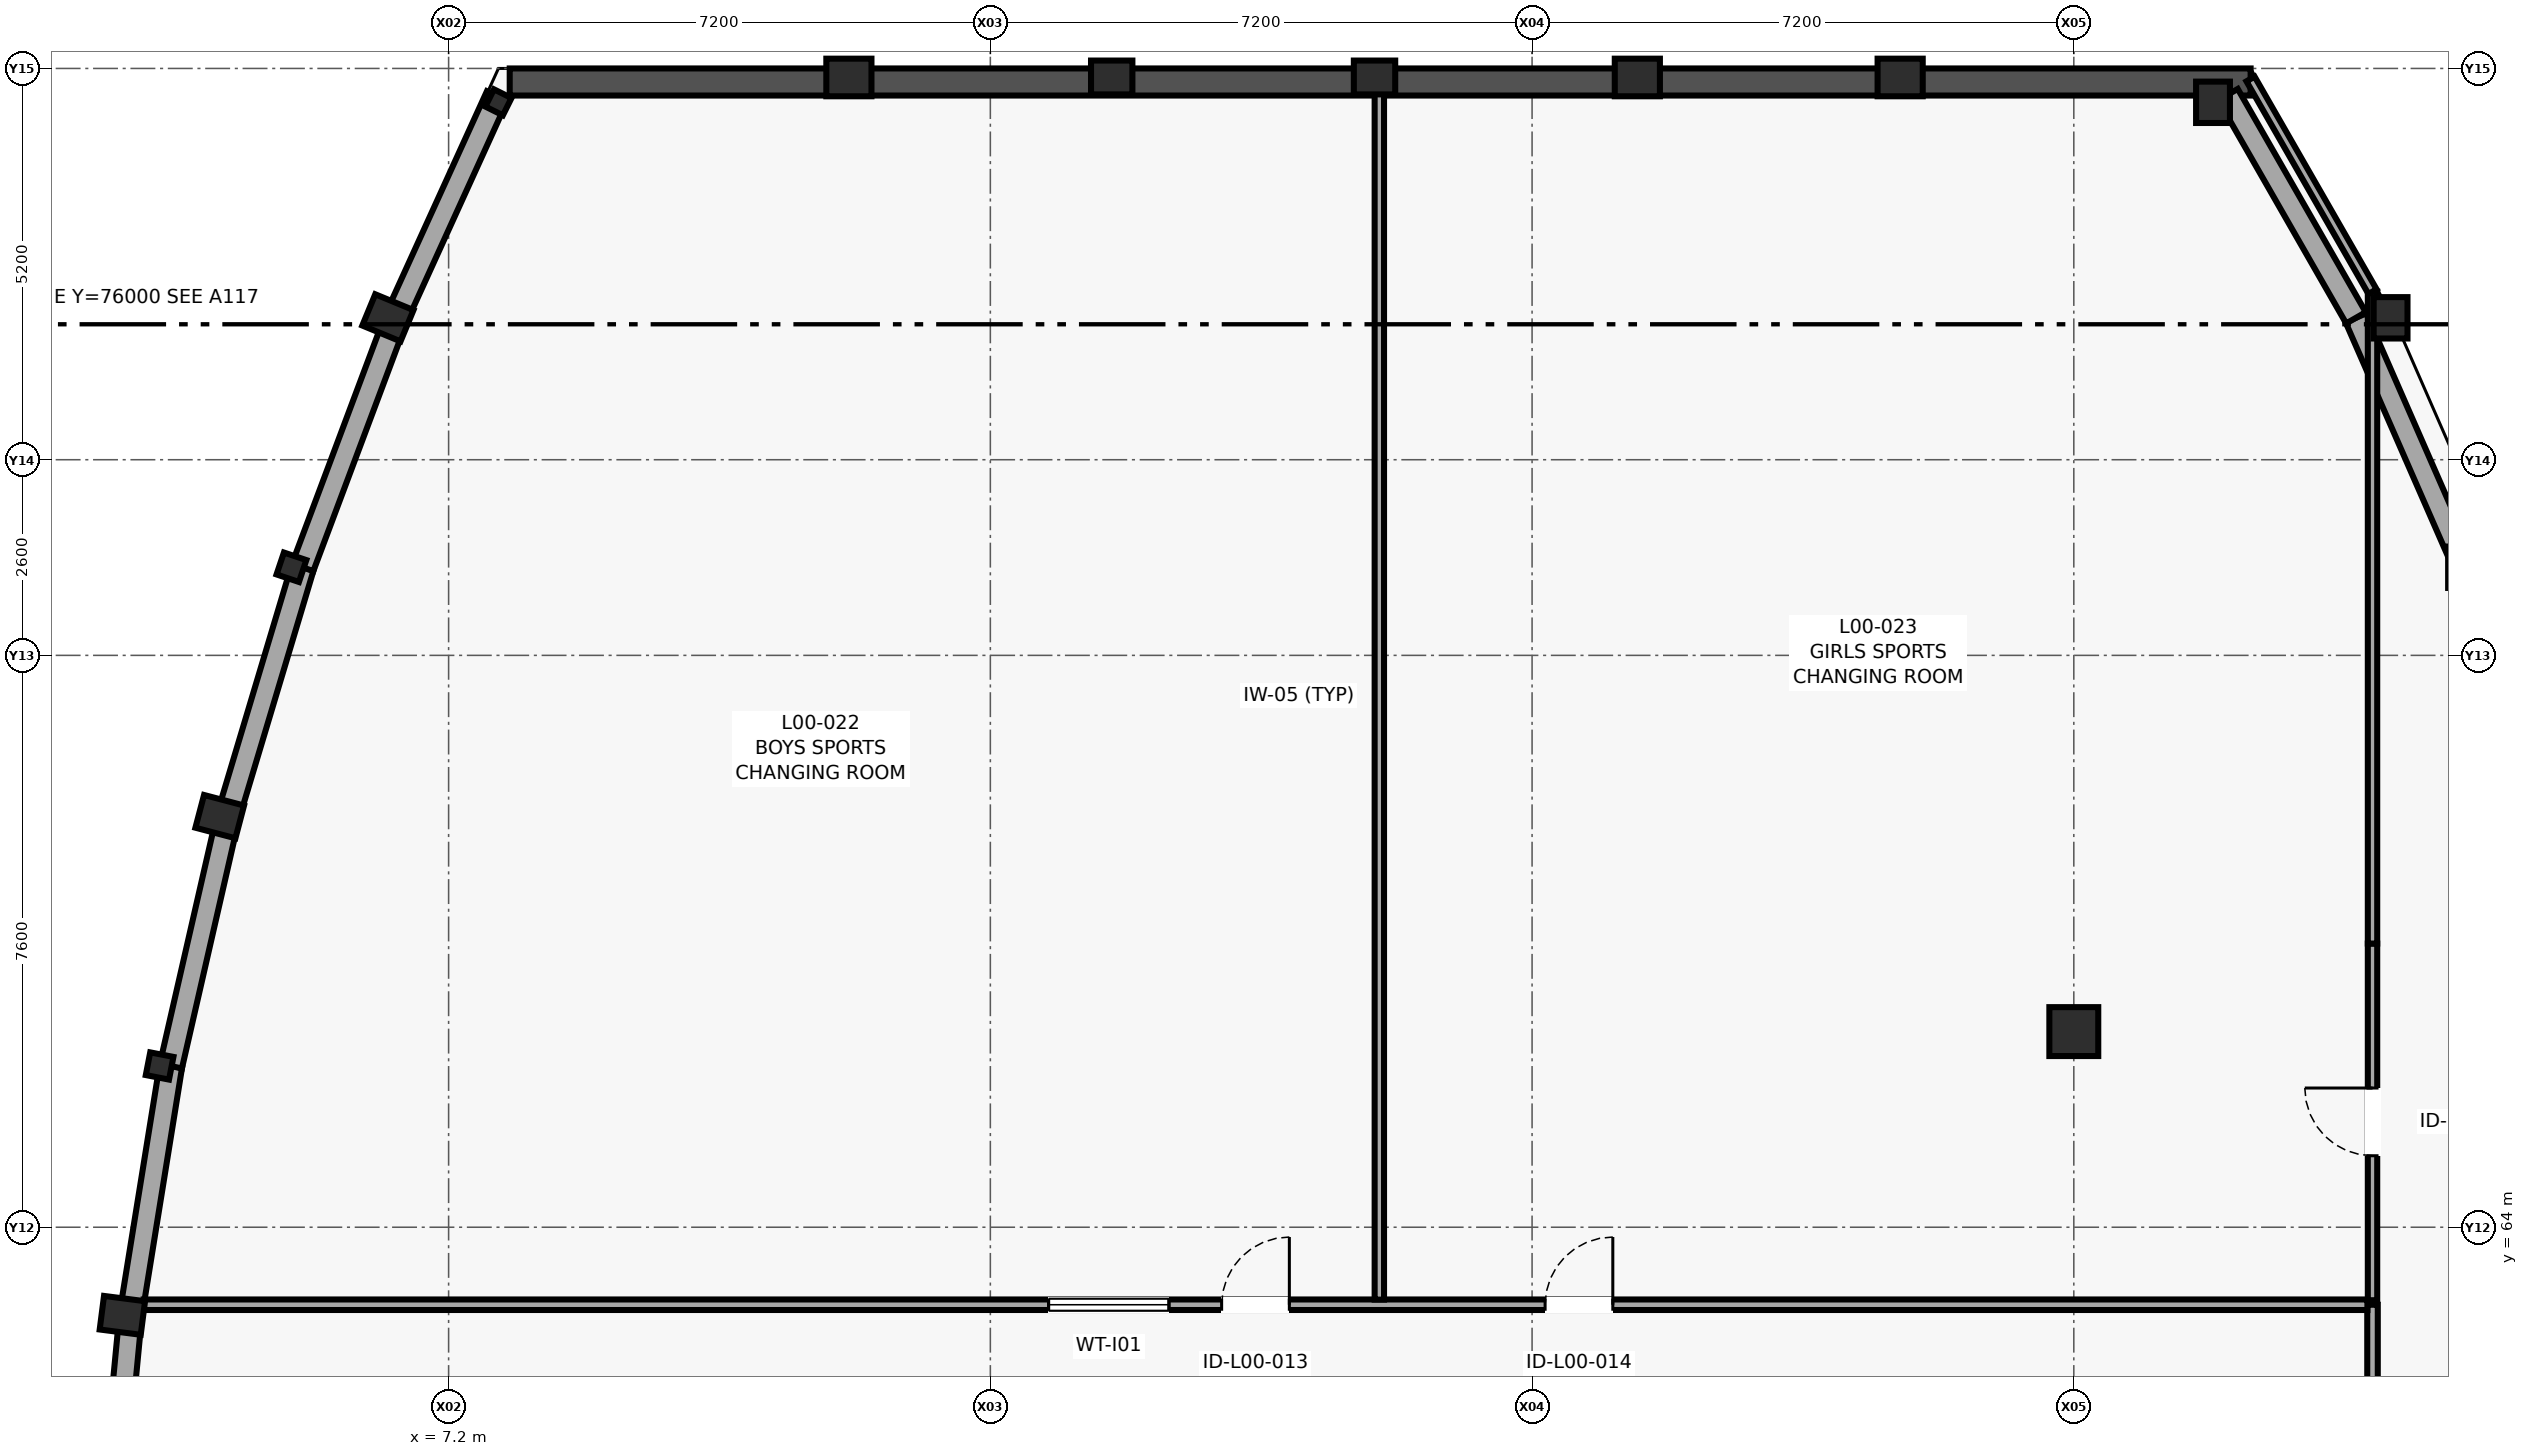
"""IFC4 building model, lengths in metres.
Left out: names, types, materials, properties, quantities, classifications, styles, units other than length and angle.
Written with IfcOpenShell. Run it as: python <this file> out.ifc"""

import sys

from ifc_helpers import new_model, si_unit, direction, frame, frame_2d, origin, origin_2d, place, context, subcontext, project, spatial, rectangle, i_section, extrude, element, fill, save


model = new_model("IFC4")
c1 = context("Model", 3, precision=1e-05, world=origin(), true_north=direction((0.0, 1.0)))
c2 = subcontext(c1, "Body", "Model", "MODEL_VIEW")
j1 = project(units=[si_unit("LENGTHUNIT", "METRE"), si_unit("PLANEANGLEUNIT", "RADIAN")], contexts=[c1])
p1 = place(None, origin())
s1 = spatial("IfcSite", under=j1, at=p1, CompositionType="ELEMENT")
p2 = place(p1, origin())
s2 = spatial("IfcBuilding", under=s1, at=p2, CompositionType="ELEMENT")
p3 = place(p2, origin())
s3 = spatial("IfcBuildingStorey", under=s2, at=p3, CompositionType="ELEMENT", Elevation=0.0)
p4 = place(p3, frame((2.864, 62.829, 0.0), z_axis=(0.0, 0.0, 1.0), x_axis=(0.12741083733, 0.991850028246, 0.0)))
e1 = element("IfcColumn", 1, at=p4, inside=s3, PredefinedType="PILASTER", context=c2, shape_type="SweptSolid", body=[
    extrude(rectangle(XDim=0.45, YDim=0.55, at=origin_2d()), origin(), (0.0, 0.0, 1.0), 4.2),
])
p5 = place(p3, frame((3.359, 66.143, 0.0), z_axis=(0.0, 0.0, 1.0), x_axis=(0.191151636272, 0.981560518741, 0.0)))
e2 = element("IfcColumn", 2, at=p5, inside=s3, PredefinedType="COLUMN", context=c2, shape_type="SweptSolid", body=[
    extrude(i_section(OverallWidth=0.307, OverallDepth=0.314, WebThickness=0.012, FlangeThickness=0.019, FilletRadius=0.015, at=origin_2d()), origin(), (0.0, 0.0, 1.0), 4.2),
])
p6 = place(p3, frame((4.158, 69.457, 0.0), z_axis=(0.0, 0.0, 1.0), x_axis=(0.2549394954, 0.966957007154, 0.0)))
e3 = element("IfcColumn", 3, at=p6, inside=s3, PredefinedType="PILASTER", context=c2, shape_type="SweptSolid", body=[
    extrude(rectangle(XDim=0.45, YDim=0.55, at=origin_2d()), origin(), (0.0, 0.0, 1.0), 4.2),
])
p7 = place(p3, frame((5.111, 72.771, 0.0), z_axis=(0.0, 0.0, 1.0), x_axis=(0.318628456287, 0.947879690069, 0.0)))
e4 = element("IfcColumn", 4, at=p7, inside=s3, PredefinedType="COLUMN", context=c2, shape_type="SweptSolid", body=[
    extrude(i_section(OverallWidth=0.307, OverallDepth=0.314, WebThickness=0.012, FlangeThickness=0.019, FilletRadius=0.015, at=origin_2d()), origin(), (0.0, 0.0, 1.0), 4.2),
])
p8 = place(p3, frame((6.393, 76.086, 0.0), z_axis=(0.0, 0.0, 1.0), x_axis=(0.382360914263, 0.92401305794, 0.0)))
e5 = element("IfcColumn", 5, at=p8, inside=s3, PredefinedType="PILASTER", context=c2, shape_type="SweptSolid", body=[
    extrude(rectangle(XDim=0.45, YDim=0.55, at=origin_2d()), origin(), (0.0, 0.0, 1.0), 4.2),
])
p9 = place(p3, frame((7.862, 78.95, 0.0), z_axis=(0.0, 0.0, 1.0), x_axis=(0.44619781311, 0.894934361602, 0.0)))
e6 = element("IfcColumn", 6, at=p9, inside=s3, PredefinedType="COLUMN", context=c2, shape_type="SweptSolid", body=[
    extrude(i_section(OverallWidth=0.256, OverallDepth=0.26, WebThickness=0.01, FlangeThickness=0.017, FilletRadius=0.013, at=origin_2d()), origin(), (0.0, 0.0, 1.0), 4.2),
])
p10 = place(p3, frame((12.52, 79.28, 0.0), z_axis=(0.0, 0.0, 1.0), x_axis=(0.0, 1.0, 0.0)))
e7 = element("IfcColumn", 7, at=p10, inside=s3, PredefinedType="PILASTER", context=c2, shape_type="SweptSolid", body=[
    extrude(rectangle(XDim=0.5, YDim=0.6, at=origin_2d()), origin(), (0.0, 0.0, 1.0), 4.2),
])
for number, where, z_axis, x_axis in (
    (8, (16.013, 79.28, 0.0), (0.0, 0.0, 1.0), (0.0, 1.0, 0.0)),
    (9, (19.506, 79.28, 0.0), (0.0, 0.0, 1.0), (0.0, 1.0, 0.0)),
):
    element("IfcColumn", number, at=place(p3, frame(where, z_axis=z_axis, x_axis=x_axis)), inside=s3, PredefinedType="PILASTER", context=c2, shape_type="SweptSolid", body=[
        extrude(rectangle(XDim=0.45, YDim=0.55, at=origin_2d()), origin(), (0.0, 0.0, 1.0), 4.2),
    ])
for number, where, z_axis, x_axis in (
    (10, (22.999, 79.28, 0.0), (0.0, 0.0, 1.0), (0.0, 1.0, 0.0)),
    (11, (26.492, 79.28, 0.0), (0.0, 0.0, 1.0), (0.0, 1.0, 0.0)),
):
    element("IfcColumn", number, at=place(p3, frame(where, z_axis=z_axis, x_axis=x_axis)), inside=s3, PredefinedType="PILASTER", context=c2, shape_type="SweptSolid", body=[
        extrude(rectangle(XDim=0.5, YDim=0.6, at=origin_2d()), origin(), (0.0, 0.0, 1.0), 4.2),
    ])
p11 = place(p3, frame((28.8, 66.6, 0.0), z_axis=(0.0, 0.0, 1.0), x_axis=(1.0, 0.0, 0.0)))
e12 = element("IfcColumn", 12, at=p11, inside=s3, PredefinedType="COLUMN", context=c2, shape_type="SweptSolid", body=[
    extrude(rectangle(XDim=0.65, YDim=0.65, at=origin_2d()), origin(), (0.0, 0.0, 1.0), 4.2),
])
for number, where, z_axis, x_axis in (
    (13, (30.65, 78.95, 0.0), (0.0, 0.0, 1.0), (1.0, 0.0, 0.0)),
    (14, (33.01, 76.086, 0.0), (0.0, 0.0, 1.0), (1.0, 0.0, 0.0)),
):
    element("IfcColumn", number, at=place(p3, frame(where, z_axis=z_axis, x_axis=x_axis)), inside=s3, PredefinedType="PILASTER", context=c2, shape_type="SweptSolid", body=[
        extrude(rectangle(XDim=0.45, YDim=0.55, at=origin_2d()), origin(), (0.0, 0.0, 1.0), 4.2),
    ])
p12 = place(p3, frame((2.974, 62.829, 0.0), z_axis=(0.0, 0.0, 1.0), x_axis=(-0.095518246268, -0.995427679256, 0.0)))
e15 = element("IfcWall", 15, at=p12, inside=s3, PredefinedType="SOLIDWALL", context=c2, shape_type="SweptSolid", body=[
    extrude(rectangle(XDim=3.33, YDim=0.3, at=frame_2d((1.665, 0.0))), origin(), (0.0, 0.0, 1.0), 3.68),
])
p13 = place(p12, frame((1.04, 0.0, 1.15)))
e16 = element("IfcOpeningElement", 16, at=p13, cuts=e15, PredefinedType="OPENING", context=c2, shape_type="SweptSolid", body=[
    extrude(rectangle(XDim=1.25, YDim=1.25, at=frame_2d((0.625, 0.625))), frame((0.0, 0.16, 0.0), z_axis=(0.0, -1.0, 0.0), x_axis=(1.0, 0.0, 0.0)), (0.0, 0.0, 1.0), 0.32),
])
p14 = place(p3, frame((3.509, 66.143, 0.0), z_axis=(0.0, 0.0, 1.0), x_axis=(-0.159349054769, -0.987222304623, 0.0)))
e17 = element("IfcWall", 17, at=p14, inside=s3, PredefinedType="SOLIDWALL", context=c2, shape_type="SweptSolid", body=[
    extrude(rectangle(XDim=3.357, YDim=0.3, at=frame_2d((1.678, 0.0))), origin(), (0.0, 0.0, 1.0), 3.68),
])
p15 = place(p3, frame((4.268, 69.457, 0.0), z_axis=(0.0, 0.0, 1.0), x_axis=(-0.223259599234, -0.974759022195, 0.0)))
e18 = element("IfcWall", 18, at=p15, inside=s3, PredefinedType="SOLIDWALL", context=c2, shape_type="SweptSolid", body=[
    extrude(rectangle(XDim=3.4, YDim=0.3, at=frame_2d((1.7, 0.0))), origin(), (0.0, 0.0, 1.0), 3.68),
])
p16 = place(p3, frame((5.261, 72.771, 0.0), z_axis=(0.0, 0.0, 1.0), x_axis=(-0.287011200065, -0.957927226379, 0.0)))
e19 = element("IfcWall", 19, at=p16, inside=s3, PredefinedType="SOLIDWALL", context=c2, shape_type="SweptSolid", body=[
    extrude(rectangle(XDim=3.459, YDim=0.3, at=frame_2d((1.73, 0.0))), origin(), (0.0, 0.0, 1.0), 3.68),
])
p17 = place(p3, frame((6.503, 76.086, 0.0), z_axis=(0.0, 0.0, 1.0), x_axis=(-0.350836219137, -0.936436835746, 0.0)))
e20 = element("IfcWall", 20, at=p17, inside=s3, PredefinedType="SOLIDWALL", context=c2, shape_type="SweptSolid", body=[
    extrude(rectangle(XDim=3.54, YDim=0.3, at=frame_2d((1.77, 0.0))), origin(), (0.0, 0.0, 1.0), 3.68),
])
p18 = place(p3, frame((7.846, 79.036, 0.0), z_axis=(0.0, 0.0, 1.0), x_axis=(-0.414347666712, -0.910118679673, 0.0)))
e21 = element("IfcWall", 21, at=p18, inside=s3, PredefinedType="SOLIDWALL", context=c2, shape_type="SweptSolid", body=[
    extrude(rectangle(XDim=3.241, YDim=0.3, at=frame_2d((1.621, 0.0))), origin(), (0.0, 0.0, 1.0), 3.68),
])
p19 = place(p3, frame((31.15, 79.22, 0.0), z_axis=(0.0, 0.0, 1.0), x_axis=(-1.0, 0.0, 0.0)))
e22 = element("IfcWall", 22, at=p19, inside=s3, PredefinedType="SHEAR", context=c2, shape_type="SweptSolid", body=[
    extrude(rectangle(XDim=23.138, YDim=0.36, at=frame_2d((11.569, 0.0))), origin(), (0.0, 0.0, 1.0), 3.935),
])
p20 = place(p3, frame((34.0, 72.771, 0.0), z_axis=(0.0, 0.0, 1.0), x_axis=(-0.400740958437, 0.916191401526, 0.0)))
e23 = element("IfcWall", 23, at=p20, inside=s3, PredefinedType="SOLIDWALL", context=c2, shape_type="SweptSolid", body=[
    extrude(rectangle(XDim=3.618, YDim=0.3, at=frame_2d((1.809, 0.0))), origin(), (0.0, 0.0, 1.0), 3.68),
])
p21 = place(p3, frame((32.55, 76.086, 0.0), z_axis=(0.0, 0.0, 1.0), x_axis=(-0.497345429475, 0.867552605771, 0.0)))
e24 = element("IfcWall", 24, at=p21, inside=s3, PredefinedType="SOLIDWALL", context=c2, shape_type="SweptSolid", body=[
    extrude(rectangle(XDim=3.42, YDim=0.3, at=frame_2d((1.71, 0.0))), origin(), (0.0, 0.0, 1.0), 3.935),
])
p22 = place(p3, frame((32.77, 49.03, 0.0), z_axis=(0.0, 0.0, 1.0), x_axis=(0.0, 1.0, 0.0)))
e25 = element("IfcWall", 25, at=p22, inside=s3, PredefinedType="PARTITIONING", context=c2, shape_type="SweptSolid", body=[
    extrude(rectangle(XDim=13.94, YDim=0.14, at=frame_2d((6.97, 0.0))), origin(), (0.0, 0.0, 1.0), 3.93),
])
p23 = place(p22, frame((6.46, 0.0, 0.0)))
e26 = element("IfcOpeningElement", 26, at=p23, cuts=e25, PredefinedType="OPENING", context=c2, shape_type="SweptSolid", body=[
    extrude(rectangle(XDim=1.02, YDim=2.14, at=frame_2d((0.51, 1.07))), frame((0.0, 0.08, 0.0), z_axis=(0.0, -1.0, 0.0), x_axis=(1.0, 0.0, 0.0)), (0.0, 0.0, 1.0), 0.16),
])
p24 = place(p22, frame((4.522, 0.0, 0.0)))
e27 = element("IfcOpeningElement", 27, at=p24, cuts=e25, PredefinedType="OPENING", context=c2, shape_type="SweptSolid", body=[
    extrude(rectangle(XDim=1.02, YDim=2.14, at=frame_2d((0.51, 1.07))), frame((0.0, 0.08, 0.0), z_axis=(0.0, -1.0, 0.0), x_axis=(1.0, 0.0, 0.0)), (0.0, 0.0, 1.0), 0.16),
])
p25 = place(p22, frame((8.18, 0.0, 1.05)))
e28 = element("IfcOpeningElement", 28, at=p25, cuts=e25, PredefinedType="OPENING", context=c2, shape_type="SweptSolid", body=[
    extrude(rectangle(XDim=1.8, YDim=1.2, at=frame_2d((0.9, 0.6))), frame((0.0, 0.08, 0.0), z_axis=(0.0, -1.0, 0.0), x_axis=(1.0, 0.0, 0.0)), (0.0, 0.0, 1.0), 0.16),
])
p26 = place(p3, frame((32.702, 62.97, 0.0), z_axis=(0.0, 0.0, 1.0), x_axis=(-1.0, 0.0, 0.0)))
e29 = element("IfcWall", 29, at=p26, inside=s3, PredefinedType="PARTITIONING", context=c2, shape_type="SweptSolid", body=[
    extrude(rectangle(XDim=29.555, YDim=0.14, at=frame_2d((14.777, 0.0))), origin(), (0.0, 0.0, 1.0), 3.93),
])
p27 = place(p26, frame((14.328, 0.0, 0.0)))
e30 = element("IfcOpeningElement", 30, at=p27, cuts=e29, PredefinedType="OPENING", context=c2, shape_type="SweptSolid", body=[
    extrude(rectangle(XDim=0.9, YDim=2.1, at=frame_2d((0.45, 1.05))), frame((0.0, 0.08, 0.0), z_axis=(0.0, -1.0, 0.0), x_axis=(1.0, 0.0, 0.0)), (0.0, 0.0, 1.0), 0.16),
])
p28 = place(p26, frame((10.029, 0.0, 0.0)))
e31 = element("IfcOpeningElement", 31, at=p28, cuts=e29, PredefinedType="OPENING", context=c2, shape_type="SweptSolid", body=[
    extrude(rectangle(XDim=0.9, YDim=2.1, at=frame_2d((0.45, 1.05))), frame((0.0, 0.08, 0.0), z_axis=(0.0, -1.0, 0.0), x_axis=(1.0, 0.0, 0.0)), (0.0, 0.0, 1.0), 0.16),
])
p29 = place(p26, frame((15.928, 0.0, 1.05)))
e32 = element("IfcOpeningElement", 32, at=p29, cuts=e29, PredefinedType="OPENING", context=c2, shape_type="SweptSolid", body=[
    extrude(rectangle(XDim=1.6, YDim=1.1, at=frame_2d((0.8, 0.55))), frame((0.0, 0.08, 0.0), z_axis=(0.0, -1.0, 0.0), x_axis=(1.0, 0.0, 0.0)), (0.0, 0.0, 1.0), 0.16),
])
p30 = place(p3, frame((19.57, 63.038, 0.0), z_axis=(0.0, 0.0, 1.0), x_axis=(0.0, 1.0, 0.0)))
e33 = element("IfcWall", 33, at=p30, inside=s3, PredefinedType="PARTITIONING", context=c2, shape_type="SweptSolid", body=[
    extrude(rectangle(XDim=16.044, YDim=0.125, at=frame_2d((8.022, 0.0))), origin(), (0.0, 0.0, 1.0), 3.93),
])
p31 = place(p3, frame((32.77, 63.03, 0.0), z_axis=(0.0, 0.0, 1.0), x_axis=(0.0, 1.0, 0.0)))
e34 = element("IfcWall", 34, at=p31, inside=s3, PredefinedType="PARTITIONING", context=c2, shape_type="SweptSolid", body=[
    extrude(rectangle(XDim=4.74, YDim=0.125, at=frame_2d((2.37, 0.0))), origin(), (0.0, 0.0, 1.0), 3.93),
])
p32 = place(p31, frame((1.92, 0.0, 0.0)))
e35 = element("IfcOpeningElement", 35, at=p32, cuts=e34, PredefinedType="OPENING", context=c2, shape_type="SweptSolid", body=[
    extrude(rectangle(XDim=0.9, YDim=2.1, at=frame_2d((0.45, 1.05))), frame((0.0, 0.073, 0.0), z_axis=(0.0, -1.0, 0.0), x_axis=(1.0, 0.0, 0.0)), (0.0, 0.0, 1.0), 0.145),
])
p33 = place(p3, frame((32.77, 67.77, 0.0), z_axis=(0.0, 0.0, 1.0), x_axis=(0.0, 1.0, 0.0)))
e36 = element("IfcWall", 36, at=p33, inside=s3, PredefinedType="PARTITIONING", context=c2, shape_type="SweptSolid", body=[
    extrude(rectangle(XDim=8.664, YDim=0.125, at=frame_2d((4.332, 0.0))), origin(), (0.0, 0.0, 1.0), 3.93),
])
p34 = place(p3, frame((32.77, 76.434, 0.0), z_axis=(0.0, 0.0, 1.0), x_axis=(-0.497590895777, 0.867411840154, 0.0)))
e37 = element("IfcWall", 37, at=p34, inside=s3, PredefinedType="PARTITIONING", context=c2, shape_type="SweptSolid", body=[
    extrude(rectangle(XDim=3.258, YDim=0.125, at=frame_2d((1.629, 0.0))), origin(), (0.0, 0.0, 1.0), 3.93),
])
p35 = place(p27, frame((0.9, 0.0, 0.0), z_axis=(0.0, 0.0, 1.0), x_axis=(-1.0, 0.0, 0.0)))
e38 = element("IfcDoor", 38, at=p35, inside=s3, OperationType="SINGLE_SWING_LEFT", PredefinedType="DOOR", context=c2, shape_type="SweptSolid", body=[
    extrude(rectangle(XDim=0.9, YDim=2.1, at=frame_2d((0.45, 1.05))), frame((0.0, 0.025, 0.0), z_axis=(0.0, -1.0, 0.0), x_axis=(1.0, 0.0, 0.0)), (0.0, 0.0, 1.0), 0.05),
])
fill(e30, e38)
p36 = place(p28, frame((0.9, 0.0, 0.0), z_axis=(0.0, 0.0, 1.0), x_axis=(-1.0, 0.0, 0.0)))
e39 = element("IfcDoor", 39, at=p36, inside=s3, OperationType="SINGLE_SWING_LEFT", PredefinedType="DOOR", context=c2, shape_type="SweptSolid", body=[
    extrude(rectangle(XDim=0.9, YDim=2.1, at=frame_2d((0.45, 1.05))), frame((0.0, 0.025, 0.0), z_axis=(0.0, -1.0, 0.0), x_axis=(1.0, 0.0, 0.0)), (0.0, 0.0, 1.0), 0.05),
])
fill(e31, e39)
p37 = place(p29, origin())
e40 = element("IfcWindow", 40, at=p37, inside=s3, PartitioningType="SINGLE_PANEL", PredefinedType="WINDOW", context=c2, shape_type="SweptSolid", body=[
    extrude(rectangle(XDim=1.6, YDim=1.1, at=frame_2d((0.8, 0.55))), frame((0.0, 0.03, 0.0), z_axis=(0.0, -1.0, 0.0), x_axis=(1.0, 0.0, 0.0)), (0.0, 0.0, 1.0), 0.06),
])
fill(e32, e40)
p38 = place(p32, origin())
e41 = element("IfcDoor", 41, at=p38, inside=s3, OperationType="SINGLE_SWING_RIGHT", PredefinedType="DOOR", context=c2, shape_type="SweptSolid", body=[
    extrude(rectangle(XDim=0.9, YDim=2.1, at=frame_2d((0.45, 1.05))), frame((0.0, 0.025, 0.0), z_axis=(0.0, -1.0, 0.0), x_axis=(1.0, 0.0, 0.0)), (0.0, 0.0, 1.0), 0.05),
])
fill(e35, e41)
save(model, sys.argv[1])
